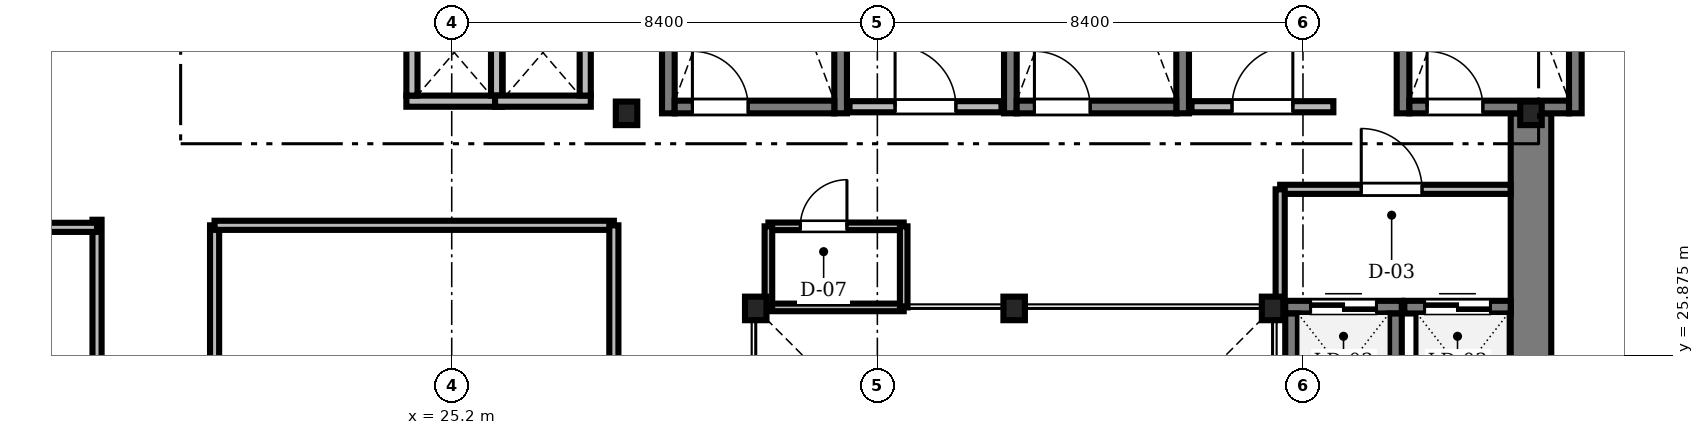
"""IFC4 building model, lengths in metres.
Left out: names, types, materials, properties, quantities, classifications, styles, units other than length and angle.
Written with IfcOpenShell. Run it as: python <this file> out.ifc"""

import sys

from ifc_helpers import new_model, si_unit, direction, frame, frame_2d, origin, origin_2d, place, context, subcontext, project, spatial, rectangle, i_section, extrude, source, transform, mapped, element, fill, save


model = new_model("IFC4")
c1 = context("Model", 3, precision=1e-05, world=origin(), true_north=direction((0.0, 1.0)))
c2 = subcontext(c1, "Body", "Model", "MODEL_VIEW")
j1 = project(units=[si_unit("LENGTHUNIT", "METRE"), si_unit("PLANEANGLEUNIT", "RADIAN")], contexts=[c1])
p1 = place(None, origin())
s1 = spatial("IfcSite", under=j1, at=p1, CompositionType="ELEMENT")
p2 = place(p1, origin())
s2 = spatial("IfcBuilding", under=s1, at=p2, CompositionType="ELEMENT")
p3 = place(p2, frame((0.0, 0.0, 111.3)))
s3 = spatial("IfcBuildingStorey", under=s2, at=p3, CompositionType="ELEMENT", Elevation=111.3)
m1 = source(origin(), c2, "Body", "SweptSolid", [
    extrude(rectangle(XDim=13.15, YDim=0.8, at=frame_2d((6.575, 0.0))), origin(), (0.0, 0.0, 1.0), 3.46),
])
p4 = place(p3, frame((46.5, 17.5, 0.0), z_axis=(0.0, 0.0, 1.0), x_axis=(0.0, 1.0, 0.0)))
e1 = element("IfcWall", 1, at=p4, inside=s3, PredefinedType="SHEAR", context=c2, shape_type="MappedRepresentation", body=[
    mapped(m1, transform((0.0, 0.0, 0.0), scale=1.0)),
])
m2 = source(origin(), c2, "Body", "SweptSolid", [
    extrude(i_section(OverallWidth=0.424, OverallDepth=0.465, WebThickness=0.035, FlangeThickness=0.056, FilletRadius=0.015, at=origin_2d()), origin(), (0.0, 0.0, 1.0), 3.46),
])
for number, where, z_axis, x_axis in (
    (2, (41.4, 26.8, 0.0), (0.0, 0.0, 1.0), (1.0, 0.0, 0.0)),
    (3, (36.3, 26.8, 0.0), (0.0, 0.0, 1.0), (1.0, 0.0, 0.0)),
    (4, (31.2, 26.8, 0.0), (0.0, 0.0, 1.0), (1.0, 0.0, 0.0)),
    (5, (28.65, 30.65, 0.0), (0.0, 0.0, 1.0), (1.0, 0.0, 0.0)),
    (6, (46.5, 30.65, 0.0), (0.0, 0.0, 1.0), (1.0, 0.0, 0.0)),
):
    element("IfcColumn", number, at=place(p3, frame(where, z_axis=z_axis, x_axis=x_axis)), inside=s3, PredefinedType="COLUMN", context=c2, shape_type="MappedRepresentation", body=[
        mapped(m2, transform((0.0, 0.0, 0.0), scale=1.0)),
    ])
m3 = source(origin(), c2, "Body", "SweptSolid", [
    extrude(rectangle(XDim=9.25, YDim=0.25, at=frame_2d((4.625, 0.0))), origin(), (0.0, 0.0, 1.0), 3.5),
])
for number, where, z_axis, x_axis in (
    (7, (29.475, 30.65, 0.0), (0.0, 0.0, 1.0), (0.0, 1.0, 0.0)),
    (8, (32.875, 30.65, 0.0), (0.0, 0.0, 1.0), (0.0, 1.0, 0.0)),
):
    element("IfcWall", number, at=place(p3, frame(where, z_axis=z_axis, x_axis=x_axis)), inside=s3, PredefinedType="SOLIDWALL", context=c2, shape_type="MappedRepresentation", body=[
        mapped(m3, transform((0.0, 0.0, 0.0), scale=1.0)),
    ])
m4 = source(origin(), c2, "Body", "SweptSolid", [
    extrude(rectangle(XDim=3.15, YDim=0.25, at=frame_2d((1.575, 0.0))), origin(), (0.0, 0.0, 1.0), 3.5),
])
p5 = place(p3, frame((29.6, 30.775, 0.0), z_axis=(0.0, 0.0, 1.0), x_axis=(1.0, 0.0, 0.0)))
e9 = element("IfcWall", 9, at=p5, inside=s3, PredefinedType="SOLIDWALL", context=c2, shape_type="MappedRepresentation", body=[
    mapped(m4, transform((0.0, 0.0, 0.0), scale=1.0)),
])
m5 = source(origin(), c2, "Body", "SweptSolid", [
    extrude(rectangle(XDim=1.1, YDim=2.2, at=frame_2d((0.55, 1.1))), frame((0.0, 0.135, 0.0), z_axis=(0.0, -1.0, 0.0), x_axis=(1.0, 0.0, 0.0)), (0.0, 0.0, 1.0), 0.27),
])
p6 = place(p5, frame((0.35, 0.0, 0.0)))
e10 = element("IfcOpeningElement", 10, at=p6, cuts=e9, PredefinedType="OPENING", context=c2, shape_type="MappedRepresentation", body=[
    mapped(m5, transform((0.0, 0.0, 0.0), scale=1.0)),
])
for number, where, z_axis, x_axis in (
    (11, (36.225, 30.65, 0.0), (0.0, 0.0, 1.0), (0.0, 1.0, 0.0)),
    (12, (39.625, 30.65, 0.0), (0.0, 0.0, 1.0), (0.0, 1.0, 0.0)),
):
    element("IfcWall", number, at=place(p3, frame(where, z_axis=z_axis, x_axis=x_axis)), inside=s3, PredefinedType="SOLIDWALL", context=c2, shape_type="MappedRepresentation", body=[
        mapped(m3, transform((0.0, 0.0, 0.0), scale=1.0)),
    ])
p7 = place(p3, frame((36.35, 30.775, 0.0), z_axis=(0.0, 0.0, 1.0), x_axis=(1.0, 0.0, 0.0)))
e13 = element("IfcWall", 13, at=p7, inside=s3, PredefinedType="SOLIDWALL", context=c2, shape_type="MappedRepresentation", body=[
    mapped(m4, transform((0.0, 0.0, 0.0), scale=1.0)),
])
p8 = place(p7, frame((0.35, 0.0, 0.0)))
e14 = element("IfcOpeningElement", 14, at=p8, cuts=e13, PredefinedType="OPENING", context=c2, shape_type="MappedRepresentation", body=[
    mapped(m5, transform((0.0, 0.0, 0.0), scale=1.0)),
])
for number, where, z_axis, x_axis in (
    (15, (43.975, 30.65, 0.0), (0.0, 0.0, 1.0), (0.0, 1.0, 0.0)),
    (16, (47.375, 30.65, 0.0), (0.0, 0.0, 1.0), (0.0, 1.0, 0.0)),
):
    element("IfcWall", number, at=place(p3, frame(where, z_axis=z_axis, x_axis=x_axis)), inside=s3, PredefinedType="SOLIDWALL", context=c2, shape_type="MappedRepresentation", body=[
        mapped(m3, transform((0.0, 0.0, 0.0), scale=1.0)),
    ])
p9 = place(p3, frame((44.1, 30.775, 0.0), z_axis=(0.0, 0.0, 1.0), x_axis=(1.0, 0.0, 0.0)))
e17 = element("IfcWall", 17, at=p9, inside=s3, PredefinedType="SOLIDWALL", context=c2, shape_type="MappedRepresentation", body=[
    mapped(m4, transform((0.0, 0.0, 0.0), scale=1.0)),
])
p10 = place(p9, frame((0.35, 0.0, 0.0)))
e18 = element("IfcOpeningElement", 18, at=p10, cuts=e17, PredefinedType="OPENING", context=c2, shape_type="MappedRepresentation", body=[
    mapped(m5, transform((0.0, 0.0, 0.0), scale=1.0)),
])
m6 = source(origin(), c2, "Body", "SweptSolid", [
    extrude(rectangle(XDim=3.0, YDim=0.22, at=frame_2d((1.5, 0.0))), origin(), (0.0, 0.0, 1.0), 3.46),
])
p11 = place(p3, frame((33.05, 30.78, 0.0), z_axis=(0.0, 0.0, 1.0), x_axis=(1.0, 0.0, 0.0)))
e19 = element("IfcWall", 19, at=p11, inside=s3, PredefinedType="SOLIDWALL", context=c2, shape_type="MappedRepresentation", body=[
    mapped(m6, transform((0.0, 0.0, 0.0), scale=1.0)),
])
m7 = source(origin(), c2, "Body", "SweptSolid", [
    extrude(rectangle(XDim=1.2, YDim=2.2, at=frame_2d((0.6, 1.1))), frame((0.0, 0.12, 0.0), z_axis=(0.0, -1.0, 0.0), x_axis=(1.0, 0.0, 0.0)), (0.0, 0.0, 1.0), 0.24),
])
p12 = place(p11, frame((0.9, 0.0, 0.0)))
e20 = element("IfcOpeningElement", 20, at=p12, cuts=e19, PredefinedType="OPENING", context=c2, shape_type="MappedRepresentation", body=[
    mapped(m7, transform((0.0, 0.0, 0.0), scale=1.0)),
])
m8 = source(origin(), c2, "Body", "SweptSolid", [
    extrude(rectangle(XDim=2.8, YDim=0.22, at=frame_2d((1.4, 0.0))), origin(), (0.0, 0.0, 1.0), 3.46),
])
p13 = place(p3, frame((39.8, 30.78, 0.0), z_axis=(0.0, 0.0, 1.0), x_axis=(1.0, 0.0, 0.0)))
e21 = element("IfcWall", 21, at=p13, inside=s3, PredefinedType="SOLIDWALL", context=c2, shape_type="MappedRepresentation", body=[
    mapped(m8, transform((0.0, 0.0, 0.0), scale=1.0)),
])
p14 = place(p13, frame((0.8, 0.0, 0.0)))
e22 = element("IfcOpeningElement", 22, at=p14, cuts=e21, PredefinedType="OPENING", context=c2, shape_type="MappedRepresentation", body=[
    mapped(m7, transform((0.0, 0.0, 0.0), scale=1.0)),
])
m9 = source(origin(), c2, "Body", "SweptSolid", [
    extrude(rectangle(XDim=1.89, YDim=0.22, at=frame_2d((0.945, 0.0))), origin(), (0.0, 0.0, 1.0), 3.46),
])
p15 = place(p3, frame((24.305, 30.89, 0.0), z_axis=(0.0, 0.0, 1.0), x_axis=(1.0, 0.0, 0.0)))
e23 = element("IfcWall", 23, at=p15, inside=s3, PredefinedType="SOLIDWALL", context=c2, shape_type="MappedRepresentation", body=[
    mapped(m9, transform((0.0, 0.0, 0.0), scale=1.0)),
])
m10 = source(origin(), c2, "Body", "SweptSolid", [
    extrude(rectangle(XDim=1.7, YDim=0.22, at=frame_2d((0.85, 0.0))), origin(), (0.0, 0.0, 1.0), 3.46),
])
for number, where, z_axis, x_axis in (
    (24, (24.415, 31.0, 0.0), (0.0, 0.0, 1.0), (0.0, 1.0, 0.0)),
    (25, (26.085, 31.0, 0.0), (0.0, 0.0, 1.0), (0.0, 1.0, 0.0)),
):
    element("IfcWall", number, at=place(p3, frame(where, z_axis=z_axis, x_axis=x_axis)), inside=s3, PredefinedType="SOLIDWALL", context=c2, shape_type="MappedRepresentation", body=[
        mapped(m10, transform((0.0, 0.0, 0.0), scale=1.0)),
    ])
p16 = place(p3, frame((26.055, 30.89, 0.0), z_axis=(0.0, 0.0, 1.0), x_axis=(1.0, 0.0, 0.0)))
e26 = element("IfcWall", 26, at=p16, inside=s3, PredefinedType="SOLIDWALL", context=c2, shape_type="MappedRepresentation", body=[
    mapped(m9, transform((0.0, 0.0, 0.0), scale=1.0)),
])
p17 = place(p3, frame((27.835, 31.0, 0.0), z_axis=(0.0, 0.0, 1.0), x_axis=(0.0, 1.0, 0.0)))
e27 = element("IfcWall", 27, at=p17, inside=s3, PredefinedType="SOLIDWALL", context=c2, shape_type="MappedRepresentation", body=[
    mapped(m10, transform((0.0, 0.0, 0.0), scale=1.0)),
])
m11 = source(origin(), c2, "Body", "SweptSolid", [
    extrude(rectangle(XDim=2.3, YDim=0.25, at=frame_2d((1.15, 0.0))), origin(), (0.0, 0.0, 1.0), 3.46),
])
p18 = place(p3, frame((41.65, 26.825, 0.0), z_axis=(0.0, 0.0, 1.0), x_axis=(1.0, 0.0, 0.0)))
e28 = element("IfcWall", 28, at=p18, inside=s3, PredefinedType="SOLIDWALL", context=c2, shape_type="MappedRepresentation", body=[
    mapped(m11, transform((0.0, 0.0, 0.0), scale=1.0)),
])
m12 = source(origin(), c2, "Body", "SweptSolid", [
    extrude(rectangle(XDim=1.3, YDim=2.3, at=frame_2d((0.65, 1.15))), frame((0.0, 0.135, 0.0), z_axis=(0.0, -1.0, 0.0), x_axis=(1.0, 0.0, 0.0)), (0.0, 0.0, 1.0), 0.27),
])
p19 = place(p18, frame((0.5, 0.0, 0.0)))
e29 = element("IfcOpeningElement", 29, at=p19, cuts=e28, PredefinedType="OPENING", context=c2, shape_type="MappedRepresentation", body=[
    mapped(m12, transform((0.0, 0.0, 0.0), scale=1.0)),
])
for number, where, z_axis, x_axis in (
    (30, (41.775, 24.4, 0.0), (0.0, 0.0, 1.0), (0.0, 1.0, 0.0)),
    (31, (43.825, 24.4, 0.0), (0.0, 0.0, 1.0), (0.0, 1.0, 0.0)),
):
    element("IfcWall", number, at=place(p3, frame(where, z_axis=z_axis, x_axis=x_axis)), inside=s3, PredefinedType="SOLIDWALL", context=c2, shape_type="MappedRepresentation", body=[
        mapped(m11, transform((0.0, 0.0, 0.0), scale=1.0)),
    ])
m13 = source(origin(), c2, "Body", "SweptSolid", [
    extrude(rectangle(XDim=2.1, YDim=0.25, at=frame_2d((1.05, 0.0))), origin(), (0.0, 0.0, 1.0), 3.46),
])
p20 = place(p3, frame((44.0, 26.825, 0.0), z_axis=(0.0, 0.0, 1.0), x_axis=(1.0, 0.0, 0.0)))
e32 = element("IfcWall", 32, at=p20, inside=s3, PredefinedType="SOLIDWALL", context=c2, shape_type="MappedRepresentation", body=[
    mapped(m13, transform((0.0, 0.0, 0.0), scale=1.0)),
])
p21 = place(p20, frame((0.4, 0.0, 0.0)))
e33 = element("IfcOpeningElement", 33, at=p21, cuts=e32, PredefinedType="OPENING", context=c2, shape_type="MappedRepresentation", body=[
    mapped(m12, transform((0.0, 0.0, 0.0), scale=1.0)),
])
m14 = source(origin(), c2, "Body", "SweptSolid", [
    extrude(rectangle(XDim=6.54, YDim=0.18, at=frame_2d((3.27, 0.0))), origin(), (0.0, 0.0, 1.0), 2.852),
])
p22 = place(p3, frame((20.52, 21.9, 0.0), z_axis=(0.0, 0.0, 1.0), x_axis=(0.0, 1.0, 0.0)))
e34 = element("IfcWall", 34, at=p22, inside=s3, PredefinedType="PARTITIONING", context=c2, shape_type="MappedRepresentation", body=[
    mapped(m14, transform((0.0, 0.0, 0.0), scale=1.0)),
])
m15 = source(origin(), c2, "Body", "SweptSolid", [
    extrude(rectangle(XDim=1.05, YDim=2.2, at=frame_2d((0.525, 1.1))), frame((0.0, 0.1, 0.0), z_axis=(0.0, -1.0, 0.0), x_axis=(1.0, 0.0, 0.0)), (0.0, 0.0, 1.0), 0.2),
])
p23 = place(p22, frame((2.2, 0.0, 0.0)))
e35 = element("IfcOpeningElement", 35, at=p23, cuts=e34, PredefinedType="OPENING", context=c2, shape_type="MappedRepresentation", body=[
    mapped(m15, transform((0.0, 0.0, 0.0), scale=1.0)),
])
m16 = source(origin(), c2, "Body", "SweptSolid", [
    extrude(rectangle(XDim=4.548, YDim=0.18, at=frame_2d((2.274, 0.0))), origin(), (0.0, 0.0, 1.0), 3.092),
])
p24 = place(p3, frame((41.55, 29.15, 0.0), z_axis=(0.0, 0.0, 1.0), x_axis=(1.0, 0.0, 0.0)))
e36 = element("IfcWall", 36, at=p24, inside=s3, PredefinedType="PARTITIONING", context=c2, shape_type="MappedRepresentation", body=[
    mapped(m16, transform((0.0, 0.0, 0.0), scale=1.0)),
])
m17 = source(origin(), c2, "Body", "SweptSolid", [
    extrude(rectangle(XDim=1.2, YDim=2.2, at=frame_2d((0.6, 1.1))), frame((0.0, 0.1, 0.0), z_axis=(0.0, -1.0, 0.0), x_axis=(1.0, 0.0, 0.0)), (0.0, 0.0, 1.0), 0.2),
])
p25 = place(p24, frame((1.6, 0.0, 0.0)))
e37 = element("IfcOpeningElement", 37, at=p25, cuts=e36, PredefinedType="OPENING", context=c2, shape_type="MappedRepresentation", body=[
    mapped(m17, transform((0.0, 0.0, 0.0), scale=1.0)),
])
m18 = source(origin(), c2, "Body", "SweptSolid", [
    extrude(rectangle(XDim=2.67, YDim=0.15, at=frame_2d((1.335, 0.0))), origin(), (0.0, 0.0, 1.0), 3.092),
])
p26 = place(p3, frame((31.45, 28.42, 0.0), z_axis=(0.0, 0.0, 1.0), x_axis=(1.0, 0.0, 0.0)))
e38 = element("IfcWall", 38, at=p26, inside=s3, PredefinedType="PARTITIONING", context=c2, shape_type="MappedRepresentation", body=[
    mapped(m18, transform((0.0, 0.0, 0.0), scale=1.0)),
])
m19 = source(origin(), c2, "Body", "SweptSolid", [
    extrude(rectangle(XDim=0.92, YDim=2.1, at=frame_2d((0.46, 1.05))), frame((0.0, 0.085, 0.0), z_axis=(0.0, -1.0, 0.0), x_axis=(1.0, 0.0, 0.0)), (0.0, 0.0, 1.0), 0.17),
])
p27 = place(p26, frame((0.63, 0.0, 0.0)))
e39 = element("IfcOpeningElement", 39, at=p27, cuts=e38, PredefinedType="OPENING", context=c2, shape_type="MappedRepresentation", body=[
    mapped(m19, transform((0.0, 0.0, 0.0), scale=1.0)),
])
m20 = source(origin(), c2, "Body", "SweptSolid", [
    extrude(rectangle(XDim=14.0, YDim=0.18, at=frame_2d((7.0, 0.0))), origin(), (0.0, 0.0, 1.0), 2.852),
])
p28 = place(p3, frame((18.2, 14.55, 0.0), z_axis=(0.0, 0.0, 1.0), x_axis=(0.0, 1.0, 0.0)))
e40 = element("IfcWall", 40, at=p28, inside=s3, PredefinedType="PARTITIONING", context=c2, shape_type="MappedRepresentation", body=[
    mapped(m20, transform((0.0, 0.0, 0.0), scale=1.0)),
])
m21 = source(origin(), c2, "Body", "SweptSolid", [
    extrude(rectangle(XDim=11.47, YDim=0.18, at=frame_2d((5.735, 0.0))), origin(), (0.0, 0.0, 1.0), 2.702),
])
p29 = place(p3, frame((6.73, 28.4, 0.0), z_axis=(0.0, 0.0, 1.0), x_axis=(1.0, 0.0, 0.0)))
e41 = element("IfcWall", 41, at=p29, inside=s3, PredefinedType="PARTITIONING", context=c2, shape_type="MappedRepresentation", body=[
    mapped(m21, transform((0.0, 0.0, 0.0), scale=1.0)),
])
m22 = source(origin(), c2, "Body", "SweptSolid", [
    extrude(rectangle(XDim=7.88, YDim=0.18, at=frame_2d((3.94, 0.0))), origin(), (0.0, 0.0, 1.0), 3.46),
])
p30 = place(p3, frame((20.52, 28.44, 0.0), z_axis=(0.0, 0.0, 1.0), x_axis=(1.0, 0.0, 0.0)))
e42 = element("IfcWall", 42, at=p30, inside=s3, PredefinedType="PARTITIONING", context=c2, shape_type="MappedRepresentation", body=[
    mapped(m22, transform((0.0, 0.0, 0.0), scale=1.0)),
])
p31 = place(p3, frame((28.4, 21.9, 0.0), z_axis=(0.0, 0.0, 1.0), x_axis=(0.0, 1.0, 0.0)))
e43 = element("IfcWall", 43, at=p31, inside=s3, PredefinedType="PARTITIONING", context=c2, shape_type="MappedRepresentation", body=[
    mapped(m14, transform((0.0, 0.0, 0.0), scale=1.0)),
])
m23 = source(origin(), c2, "Body", "SweptSolid", [
    extrude(rectangle(XDim=2.67, YDim=0.15, at=frame_2d((1.335, 0.0))), origin(), (0.0, 0.0, 1.0), 3.002),
])
p32 = place(p3, frame((31.45, 26.82, 0.0), z_axis=(0.0, 0.0, 1.0), x_axis=(1.0, 0.0, 0.0)))
e44 = element("IfcWall", 44, at=p32, inside=s3, PredefinedType="PARTITIONING", context=c2, shape_type="MappedRepresentation", body=[
    mapped(m23, transform((0.0, 0.0, 0.0), scale=1.0)),
])
m24 = source(origin(), c2, "Body", "SweptSolid", [
    extrude(rectangle(XDim=2.35, YDim=0.18, at=frame_2d((1.175, 0.0))), origin(), (0.0, 0.0, 1.0), 2.852),
])
p33 = place(p3, frame((41.55, 26.8, 0.0), z_axis=(0.0, 0.0, 1.0), x_axis=(0.0, 1.0, 0.0)))
e45 = element("IfcWall", 45, at=p33, inside=s3, PredefinedType="PARTITIONING", context=c2, shape_type="MappedRepresentation", body=[
    mapped(m24, transform((0.0, 0.0, 0.0), scale=1.0)),
])
m25 = source(origin(), c2, "Body", "SweptSolid", [
    extrude(rectangle(XDim=1.6, YDim=0.15, at=frame_2d((0.8, 0.0))), origin(), (0.0, 0.0, 1.0), 3.002),
])
for number, where, z_axis, x_axis in (
    (46, (31.45, 26.82, 0.0), (0.0, 0.0, 1.0), (0.0, 1.0, 0.0)),
    (47, (34.12, 26.82, 0.0), (0.0, 0.0, 1.0), (0.0, 1.0, 0.0)),
):
    element("IfcWall", number, at=place(p3, frame(where, z_axis=z_axis, x_axis=x_axis)), inside=s3, PredefinedType="PARTITIONING", context=c2, shape_type="MappedRepresentation", body=[
        mapped(m25, transform((0.0, 0.0, 0.0), scale=1.0)),
    ])
m26 = source(origin(), c2, "Body", "SweptSolid", [
    extrude(rectangle(XDim=1.1, YDim=2.2, at=frame_2d((0.55, 1.1))), frame((0.0, 0.025, 0.0), z_axis=(0.0, -1.0, 0.0), x_axis=(1.0, 0.0, 0.0)), (0.0, 0.0, 1.0), 0.05),
])
p34 = place(p6, origin())
e48 = element("IfcDoor", 48, at=p34, inside=s3, OperationType="SINGLE_SWING_LEFT", PredefinedType="DOOR", context=c2, shape_type="MappedRepresentation", body=[
    mapped(m26, transform((0.0, 0.0, 0.0), scale=1.0)),
])
fill(e10, e48)
p35 = place(p8, origin())
e49 = element("IfcDoor", 49, at=p35, inside=s3, OperationType="SINGLE_SWING_LEFT", PredefinedType="DOOR", context=c2, shape_type="MappedRepresentation", body=[
    mapped(m26, transform((0.0, 0.0, 0.0), scale=1.0)),
])
fill(e14, e49)
p36 = place(p10, origin())
e50 = element("IfcDoor", 50, at=p36, inside=s3, OperationType="SINGLE_SWING_LEFT", PredefinedType="DOOR", context=c2, shape_type="MappedRepresentation", body=[
    mapped(m26, transform((0.0, 0.0, 0.0), scale=1.0)),
])
fill(e18, e50)
m27 = source(origin(), c2, "Body", "SweptSolid", [
    extrude(rectangle(XDim=1.2, YDim=2.2, at=frame_2d((0.6, 1.1))), frame((0.0, 0.025, 0.0), z_axis=(0.0, -1.0, 0.0), x_axis=(1.0, 0.0, 0.0)), (0.0, 0.0, 1.0), 0.05),
])
p37 = place(p12, origin())
e51 = element("IfcDoor", 51, at=p37, inside=s3, OperationType="SINGLE_SWING_LEFT", PredefinedType="DOOR", context=c2, shape_type="MappedRepresentation", body=[
    mapped(m27, transform((0.0, 0.0, 0.0), scale=1.0)),
])
fill(e20, e51)
p38 = place(p14, origin())
e52 = element("IfcDoor", 52, at=p38, inside=s3, OperationType="SINGLE_SWING_RIGHT", PredefinedType="DOOR", context=c2, shape_type="MappedRepresentation", body=[
    mapped(m27, transform((0.0, 0.0, 0.0), scale=1.0)),
])
fill(e22, e52)
m28 = source(origin(), c2, "Body", "SweptSolid", [
    extrude(rectangle(XDim=1.3, YDim=2.3, at=frame_2d((0.65, 1.15))), frame((0.0, 0.025, 0.0), z_axis=(0.0, -1.0, 0.0), x_axis=(1.0, 0.0, 0.0)), (0.0, 0.0, 1.0), 0.05),
])
p39 = place(p19, origin())
e53 = element("IfcDoor", 53, at=p39, inside=s3, OperationType="DOUBLE_DOOR_SLIDING", PredefinedType="DOOR", context=c2, shape_type="MappedRepresentation", body=[
    mapped(m28, transform((0.0, 0.0, 0.0), scale=1.0)),
])
fill(e29, e53)
p40 = place(p21, origin())
e54 = element("IfcDoor", 54, at=p40, inside=s3, OperationType="DOUBLE_DOOR_SLIDING", PredefinedType="DOOR", context=c2, shape_type="MappedRepresentation", body=[
    mapped(m28, transform((0.0, 0.0, 0.0), scale=1.0)),
])
fill(e33, e54)
p41 = place(p25, origin())
e55 = element("IfcDoor", 55, at=p41, inside=s3, OperationType="SINGLE_SWING_LEFT", PredefinedType="DOOR", context=c2, shape_type="MappedRepresentation", body=[
    mapped(m27, transform((0.0, 0.0, 0.0), scale=1.0)),
])
fill(e37, e55)
m29 = source(origin(), c2, "Body", "SweptSolid", [
    extrude(rectangle(XDim=0.92, YDim=2.1, at=frame_2d((0.46, 1.05))), frame((0.0, 0.025, 0.0), z_axis=(0.0, -1.0, 0.0), x_axis=(1.0, 0.0, 0.0)), (0.0, 0.0, 1.0), 0.05),
])
p42 = place(p27, origin())
e56 = element("IfcDoor", 56, at=p42, inside=s3, OperationType="SINGLE_SWING_RIGHT", PredefinedType="DOOR", context=c2, shape_type="MappedRepresentation", body=[
    mapped(m29, transform((0.0, 0.0, 0.0), scale=1.0)),
])
fill(e39, e56)
save(model, sys.argv[1])
